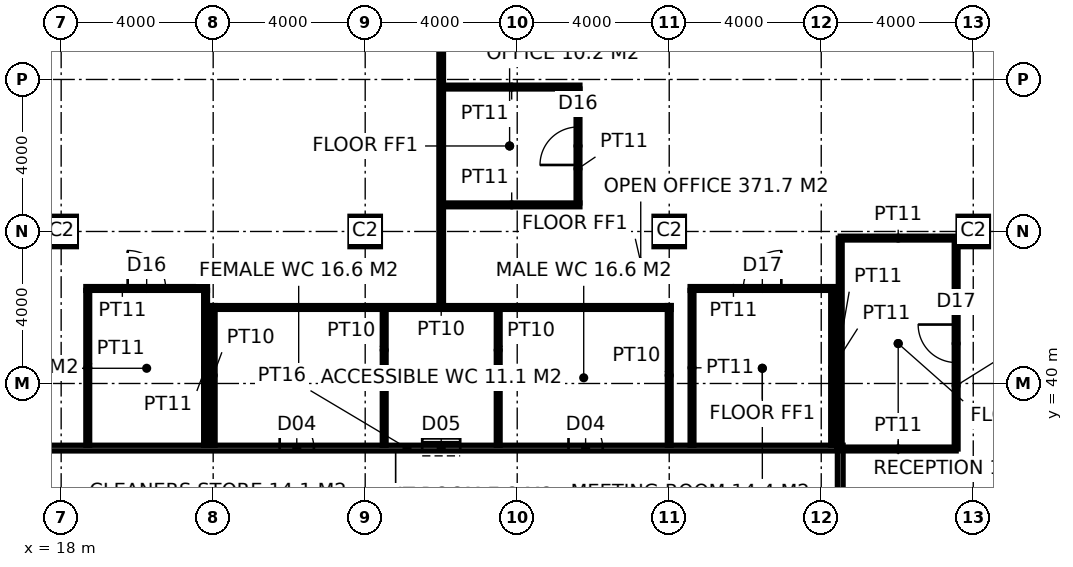
"""IFC4 building model, lengths in metres.
Left out: names, types, materials, properties, quantities, classifications, styles, units other than length and angle.
Written with IfcOpenShell. Run it as: python <this file> out.ifc"""

import sys

from ifc_helpers import new_model, si_unit, direction, frame, frame_2d, origin, origin_2d, place, context, subcontext, project, spatial, rectangle, hollow_rectangle, extrude, element, fill, save


model = new_model("IFC4")
c1 = context("Model", 3, precision=1e-05, world=origin(), true_north=direction((0.0, 1.0)))
c2 = subcontext(c1, "Body", "Model", "MODEL_VIEW")
j1 = project(units=[si_unit("LENGTHUNIT", "METRE"), si_unit("PLANEANGLEUNIT", "RADIAN")], contexts=[c1])
p1 = place(None, origin())
s1 = spatial("IfcSite", under=j1, at=p1, CompositionType="ELEMENT")
p2 = place(p1, origin())
s2 = spatial("IfcBuilding", under=s1, at=p2, CompositionType="ELEMENT")
p3 = place(p2, frame((0.0, 0.0, 230.2)))
s3 = spatial("IfcBuildingStorey", under=s2, at=p3, CompositionType="ELEMENT", Elevation=230.2)
for number, where, z_axis, x_axis in (
    (1, (18.0, 44.0, 0.0), (0.0, 0.0, 1.0), (1.0, 0.0, 0.0)),
    (2, (26.0, 44.0, 0.0), (0.0, 0.0, 1.0), (1.0, 0.0, 0.0)),
    (3, (34.0, 44.0, 0.0), (0.0, 0.0, 1.0), (1.0, 0.0, 0.0)),
    (4, (42.0, 44.0, 0.0), (0.0, 0.0, 1.0), (1.0, 0.0, 0.0)),
):
    element("IfcColumn", number, at=place(p3, frame(where, z_axis=z_axis, x_axis=x_axis)), inside=s3, PredefinedType="COLUMN", context=c2, shape_type="SweptSolid", body=[
        extrude(hollow_rectangle(XDim=0.8, YDim=0.8, WallThickness=0.08, at=origin_2d()), origin(), (0.0, 0.0, 1.0), 4.0),
    ])
p4 = place(p3, frame((38.5, 15.625, 0.0), z_axis=(0.0, 0.0, 1.0), x_axis=(0.0, 1.0, 0.0)))
e5 = element("IfcWall", 5, at=p4, inside=s3, PredefinedType="PARTITIONING", context=c2, shape_type="SweptSolid", body=[
    extrude(rectangle(XDim=22.75, YDim=0.15, at=frame_2d((11.375, 0.0))), origin(), (0.0, 0.0, 1.0), 3.85),
])
p5 = place(p4, frame((6.974, 0.0, 0.0)))
e6 = element("IfcOpeningElement", 6, at=p5, cuts=e5, PredefinedType="OPENING", context=c2, shape_type="SweptSolid", body=[
    extrude(rectangle(XDim=1.8, YDim=2.4, at=frame_2d((0.9, 1.2))), frame((0.0, 0.085, 0.0), z_axis=(0.0, -1.0, 0.0), x_axis=(1.0, 0.0, 0.0)), (0.0, 0.0, 1.0), 0.17),
])
p6 = place(p4, frame((18.226, 0.0, 0.0)))
e7 = element("IfcOpeningElement", 7, at=p6, cuts=e5, PredefinedType="OPENING", context=c2, shape_type="SweptSolid", body=[
    extrude(rectangle(XDim=1.8, YDim=2.4, at=frame_2d((0.9, 1.2))), frame((0.0, 0.085, 0.0), z_axis=(0.0, -1.0, 0.0), x_axis=(1.0, 0.0, 0.0)), (0.0, 0.0, 1.0), 0.17),
])
p7 = place(p3, frame((15.775, 38.3, 0.0), z_axis=(0.0, 0.0, 1.0), x_axis=(1.0, 0.0, 0.0)))
e8 = element("IfcWall", 8, at=p7, inside=s3, PredefinedType="PARTITIONING", context=c2, shape_type="SweptSolid", body=[
    extrude(rectangle(XDim=22.65, YDim=0.15, at=frame_2d((11.325, 0.0))), origin(), (0.0, 0.0, 1.0), 3.85),
])
p8 = place(p7, frame((7.975, 0.0, 0.0)))
e9 = element("IfcOpeningElement", 9, at=p8, cuts=e8, PredefinedType="OPENING", context=c2, shape_type="SweptSolid", body=[
    extrude(rectangle(XDim=0.9, YDim=2.1, at=frame_2d((0.45, 1.05))), frame((0.0, 0.085, 0.0), z_axis=(0.0, -1.0, 0.0), x_axis=(1.0, 0.0, 0.0)), (0.0, 0.0, 1.0), 0.17),
])
p9 = place(p7, frame((11.725, 0.0, 0.0)))
e10 = element("IfcOpeningElement", 10, at=p9, cuts=e8, PredefinedType="OPENING", context=c2, shape_type="SweptSolid", body=[
    extrude(rectangle(XDim=1.0, YDim=2.1, at=frame_2d((0.5, 1.05))), frame((0.0, 0.085, 0.0), z_axis=(0.0, -1.0, 0.0), x_axis=(1.0, 0.0, 0.0)), (0.0, 0.0, 1.0), 0.17),
])
p10 = place(p7, frame((15.575, 0.0, 0.0)))
e11 = element("IfcOpeningElement", 11, at=p10, cuts=e8, PredefinedType="OPENING", context=c2, shape_type="SweptSolid", body=[
    extrude(rectangle(XDim=0.9, YDim=2.1, at=frame_2d((0.45, 1.05))), frame((0.0, 0.085, 0.0), z_axis=(0.0, -1.0, 0.0), x_axis=(1.0, 0.0, 0.0)), (0.0, 0.0, 1.0), 0.17),
])
for number, where, z_axis, x_axis in (
    (12, (22.0, 38.375, 0.0), (0.0, 0.0, 1.0), (0.0, 1.0, 0.0)),
    (13, (34.0, 38.375, 0.0), (0.0, 0.0, 1.0), (0.0, 1.0, 0.0)),
):
    element("IfcWall", number, at=place(p3, frame(where, z_axis=z_axis, x_axis=x_axis)), inside=s3, PredefinedType="PARTITIONING", context=c2, shape_type="SweptSolid", body=[
        extrude(rectangle(XDim=3.675, YDim=0.1, at=frame_2d((1.837, 0.0))), origin(), (0.0, 0.0, 1.0), 2.95),
    ])
p11 = place(p3, frame((21.95, 42.0, 0.0), z_axis=(0.0, 0.0, 1.0), x_axis=(1.0, 0.0, 0.0)))
e14 = element("IfcWall", 14, at=p11, inside=s3, PredefinedType="PARTITIONING", context=c2, shape_type="SweptSolid", body=[
    extrude(rectangle(XDim=12.1, YDim=0.1, at=frame_2d((6.05, 0.0))), origin(), (0.0, 0.0, 1.0), 3.85),
])
for number, where, z_axis, x_axis in (
    (15, (26.5, 38.375, 0.0), (0.0, 0.0, 1.0), (0.0, 1.0, 0.0)),
    (16, (29.5, 38.375, 0.0), (0.0, 0.0, 1.0), (0.0, 1.0, 0.0)),
):
    element("IfcWall", number, at=place(p3, frame(where, z_axis=z_axis, x_axis=x_axis)), inside=s3, PredefinedType="PARTITIONING", context=c2, shape_type="SweptSolid", body=[
        extrude(rectangle(XDim=3.575, YDim=0.1, at=frame_2d((1.788, 0.0))), origin(), (0.0, 0.0, 1.0), 3.85),
    ])
p12 = place(p3, frame((28.0, 42.05, 0.0), z_axis=(0.0, 0.0, 1.0), x_axis=(0.0, 1.0, 0.0)))
e17 = element("IfcWall", 17, at=p12, inside=s3, PredefinedType="PARTITIONING", context=c2, shape_type="SweptSolid", body=[
    extrude(rectangle(XDim=13.65, YDim=0.12, at=frame_2d((6.825, 0.0))), origin(), (0.0, 0.0, 1.0), 3.85),
])
p13 = place(p3, frame((18.65, 42.5, 0.0), z_axis=(0.0, 0.0, 1.0), x_axis=(1.0, 0.0, 0.0)))
e18 = element("IfcWall", 18, at=p13, inside=s3, PredefinedType="PARTITIONING", context=c2, shape_type="SweptSolid", body=[
    extrude(rectangle(XDim=3.2, YDim=0.1, at=frame_2d((1.6, 0.0))), origin(), (0.0, 0.0, 1.0), 3.85),
])
p14 = place(p13, frame((1.1, 0.0, 0.0)))
e19 = element("IfcOpeningElement", 19, at=p14, cuts=e18, PredefinedType="OPENING", context=c2, shape_type="SweptSolid", body=[
    extrude(rectangle(XDim=1.0, YDim=2.2, at=frame_2d((0.5, 1.1))), frame((0.0, 0.06, 0.0), z_axis=(0.0, -1.0, 0.0), x_axis=(1.0, 0.0, 0.0)), (0.0, 0.0, 1.0), 0.12),
])
p15 = place(p3, frame((34.55, 42.5, 0.0), z_axis=(0.0, 0.0, 1.0), x_axis=(1.0, 0.0, 0.0)))
e20 = element("IfcWall", 20, at=p15, inside=s3, PredefinedType="PARTITIONING", context=c2, shape_type="SweptSolid", body=[
    extrude(rectangle(XDim=3.8, YDim=0.1, at=frame_2d((1.9, 0.0))), origin(), (0.0, 0.0, 1.0), 3.85),
])
p16 = place(p15, frame((1.4, 0.0, 0.0)))
e21 = element("IfcOpeningElement", 21, at=p16, cuts=e20, PredefinedType="OPENING", context=c2, shape_type="SweptSolid", body=[
    extrude(rectangle(XDim=1.0, YDim=2.2, at=frame_2d((0.5, 1.1))), frame((0.0, 0.06, 0.0), z_axis=(0.0, -1.0, 0.0), x_axis=(1.0, 0.0, 0.0)), (0.0, 0.0, 1.0), 0.12),
])
for number, where, z_axis, x_axis in (
    (22, (28.06, 44.7, 0.0), (0.0, 0.0, 1.0), (1.0, 0.0, 0.0)),
    (23, (28.06, 47.8, 0.0), (0.0, 0.0, 1.0), (1.0, 0.0, 0.0)),
):
    element("IfcWall", number, at=place(p3, frame(where, z_axis=z_axis, x_axis=x_axis)), inside=s3, PredefinedType="PARTITIONING", context=c2, shape_type="SweptSolid", body=[
        extrude(rectangle(XDim=3.59, YDim=0.1, at=frame_2d((1.795, 0.0))), origin(), (0.0, 0.0, 1.0), 3.85),
    ])
p17 = place(p3, frame((18.7, 38.375, 0.0), z_axis=(0.0, 0.0, 1.0), x_axis=(0.0, 1.0, 0.0)))
e24 = element("IfcWall", 24, at=p17, inside=s3, PredefinedType="PARTITIONING", context=c2, shape_type="SweptSolid", body=[
    extrude(rectangle(XDim=4.075, YDim=0.1, at=frame_2d((2.038, 0.0))), origin(), (0.0, 0.0, 1.0), 3.85),
])
p18 = place(p3, frame((21.8, 38.375, 0.0), z_axis=(0.0, 0.0, 1.0), x_axis=(0.0, 1.0, 0.0)))
e25 = element("IfcWall", 25, at=p18, inside=s3, PredefinedType="PARTITIONING", context=c2, shape_type="SweptSolid", body=[
    extrude(rectangle(XDim=4.075, YDim=0.1, at=frame_2d((2.038, 0.0))), origin(), (0.0, 0.0, 1.0), 2.95),
])
p19 = place(p3, frame((31.6, 44.75, 0.0), z_axis=(0.0, 0.0, 1.0), x_axis=(0.0, 1.0, 0.0)))
e26 = element("IfcWall", 26, at=p19, inside=s3, PredefinedType="PARTITIONING", context=c2, shape_type="SweptSolid", body=[
    extrude(rectangle(XDim=3.0, YDim=0.1, at=frame_2d((1.5, 0.0))), origin(), (0.0, 0.0, 1.0), 3.85),
])
p20 = place(p19, frame((1.0, 0.0, 0.0)))
e27 = element("IfcOpeningElement", 27, at=p20, cuts=e26, PredefinedType="OPENING", context=c2, shape_type="SweptSolid", body=[
    extrude(rectangle(XDim=1.0, YDim=2.2, at=frame_2d((0.5, 1.1))), frame((0.0, 0.06, 0.0), z_axis=(0.0, -1.0, 0.0), x_axis=(1.0, 0.0, 0.0)), (0.0, 0.0, 1.0), 0.12),
])
p21 = place(p3, frame((34.6, 38.375, 0.0), z_axis=(0.0, 0.0, 1.0), x_axis=(0.0, 1.0, 0.0)))
e28 = element("IfcWall", 28, at=p21, inside=s3, PredefinedType="PARTITIONING", context=c2, shape_type="SweptSolid", body=[
    extrude(rectangle(XDim=4.075, YDim=0.1, at=frame_2d((2.038, 0.0))), origin(), (0.0, 0.0, 1.0), 3.85),
])
p22 = place(p3, frame((38.3, 38.375, 0.0), z_axis=(0.0, 0.0, 1.0), x_axis=(0.0, 1.0, 0.0)))
e29 = element("IfcWall", 29, at=p22, inside=s3, PredefinedType="PARTITIONING", context=c2, shape_type="SweptSolid", body=[
    extrude(rectangle(XDim=4.075, YDim=0.1, at=frame_2d((2.038, 0.0))), origin(), (0.0, 0.0, 1.0), 2.95),
])
p23 = place(p3, frame((38.5, 38.276, 0.0), z_axis=(0.0, 0.0, 1.0), x_axis=(1.0, 0.0, 0.0)))
e30 = element("IfcWall", 30, at=p23, inside=s3, PredefinedType="PARTITIONING", context=c2, shape_type="SweptSolid", body=[
    extrude(rectangle(XDim=3.05, YDim=0.1, at=frame_2d((1.525, 0.0))), origin(), (0.0, 0.0, 1.0), 3.85),
])
p24 = place(p3, frame((41.55, 38.276, 0.0), z_axis=(0.0, 0.0, 1.0), x_axis=(0.0, 1.0, 0.0)))
e31 = element("IfcWall", 31, at=p24, inside=s3, PredefinedType="PARTITIONING", context=c2, shape_type="SweptSolid", body=[
    extrude(rectangle(XDim=5.55, YDim=0.1, at=frame_2d((2.775, 0.0))), origin(), (0.0, 0.0, 1.0), 2.95),
])
p25 = place(p24, frame((2.275, 0.0, 0.0)))
e32 = element("IfcOpeningElement", 32, at=p25, cuts=e31, PredefinedType="OPENING", context=c2, shape_type="SweptSolid", body=[
    extrude(rectangle(XDim=1.0, YDim=2.2, at=frame_2d((0.5, 1.1))), frame((0.0, 0.06, 0.0), z_axis=(0.0, -1.0, 0.0), x_axis=(1.0, 0.0, 0.0)), (0.0, 0.0, 1.0), 0.12),
])
p26 = place(p3, frame((41.55, 43.826, 0.0), z_axis=(0.0, 0.0, 1.0), x_axis=(-1.0, 0.0, 0.0)))
e33 = element("IfcWall", 33, at=p26, inside=s3, PredefinedType="PARTITIONING", context=c2, shape_type="SweptSolid", body=[
    extrude(rectangle(XDim=3.05, YDim=0.1, at=frame_2d((1.525, 0.0))), origin(), (0.0, 0.0, 1.0), 3.85),
])
p27 = place(p3, frame((38.5, 43.826, 0.0), z_axis=(0.0, 0.0, 1.0), x_axis=(0.0, -1.0, 0.0)))
e34 = element("IfcWall", 34, at=p27, inside=s3, PredefinedType="PARTITIONING", context=c2, shape_type="SweptSolid", body=[
    extrude(rectangle(XDim=5.526, YDim=0.1, at=frame_2d((2.763, 0.0))), origin(), (0.0, 0.0, 1.0), 3.85),
])
p28 = place(p8, origin())
e35 = element("IfcDoor", 35, at=p28, inside=s3, OperationType="SINGLE_SWING_LEFT", PredefinedType="DOOR", context=c2, shape_type="SweptSolid", body=[
    extrude(rectangle(XDim=0.9, YDim=2.1, at=frame_2d((0.45, 1.05))), frame((0.0, 0.025, 0.0), z_axis=(0.0, -1.0, 0.0), x_axis=(1.0, 0.0, 0.0)), (0.0, 0.0, 1.0), 0.05),
])
fill(e9, e35)
p29 = place(p9, origin())
e36 = element("IfcDoor", 36, at=p29, inside=s3, OperationType="SLIDING_TO_LEFT", PredefinedType="DOOR", context=c2, shape_type="SweptSolid", body=[
    extrude(rectangle(XDim=1.0, YDim=2.1, at=frame_2d((0.5, 1.05))), frame((0.0, 0.025, 0.0), z_axis=(0.0, -1.0, 0.0), x_axis=(1.0, 0.0, 0.0)), (0.0, 0.0, 1.0), 0.05),
])
fill(e10, e36)
p30 = place(p10, origin())
e37 = element("IfcDoor", 37, at=p30, inside=s3, OperationType="SINGLE_SWING_LEFT", PredefinedType="DOOR", context=c2, shape_type="SweptSolid", body=[
    extrude(rectangle(XDim=0.9, YDim=2.1, at=frame_2d((0.45, 1.05))), frame((0.0, 0.025, 0.0), z_axis=(0.0, -1.0, 0.0), x_axis=(1.0, 0.0, 0.0)), (0.0, 0.0, 1.0), 0.05),
])
fill(e11, e37)
p31 = place(p14, origin())
e38 = element("IfcDoor", 38, at=p31, inside=s3, OperationType="SINGLE_SWING_LEFT", PredefinedType="DOOR", context=c2, shape_type="SweptSolid", body=[
    extrude(rectangle(XDim=1.0, YDim=2.2, at=frame_2d((0.5, 1.1))), frame((0.0, 0.025, 0.0), z_axis=(0.0, -1.0, 0.0), x_axis=(1.0, 0.0, 0.0)), (0.0, 0.0, 1.0), 0.05),
])
fill(e19, e38)
p32 = place(p16, origin())
e39 = element("IfcDoor", 39, at=p32, inside=s3, OperationType="SINGLE_SWING_RIGHT", PredefinedType="DOOR", context=c2, shape_type="SweptSolid", body=[
    extrude(rectangle(XDim=1.0, YDim=2.2, at=frame_2d((0.5, 1.1))), frame((0.0, 0.025, 0.0), z_axis=(0.0, -1.0, 0.0), x_axis=(1.0, 0.0, 0.0)), (0.0, 0.0, 1.0), 0.05),
])
fill(e21, e39)
p33 = place(p20, origin())
e40 = element("IfcDoor", 40, at=p33, inside=s3, OperationType="SINGLE_SWING_LEFT", PredefinedType="DOOR", context=c2, shape_type="SweptSolid", body=[
    extrude(rectangle(XDim=1.0, YDim=2.2, at=frame_2d((0.5, 1.1))), frame((0.0, 0.025, 0.0), z_axis=(0.0, -1.0, 0.0), x_axis=(1.0, 0.0, 0.0)), (0.0, 0.0, 1.0), 0.05),
])
fill(e27, e40)
p34 = place(p25, origin())
e41 = element("IfcDoor", 41, at=p34, inside=s3, OperationType="SINGLE_SWING_RIGHT", PredefinedType="DOOR", context=c2, shape_type="SweptSolid", body=[
    extrude(rectangle(XDim=1.0, YDim=2.2, at=frame_2d((0.5, 1.1))), frame((0.0, 0.025, 0.0), z_axis=(0.0, -1.0, 0.0), x_axis=(1.0, 0.0, 0.0)), (0.0, 0.0, 1.0), 0.05),
])
fill(e32, e41)
save(model, sys.argv[1])
